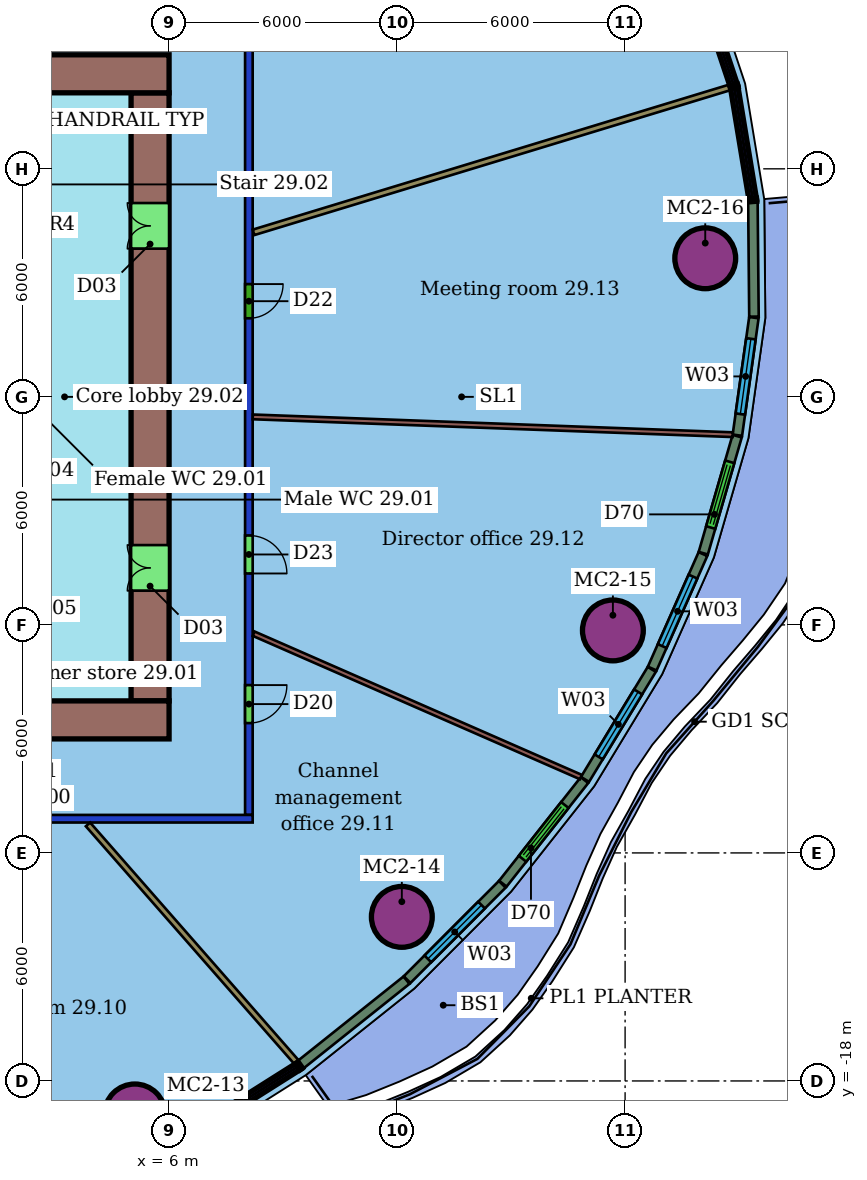
"""IFC4 building model, lengths in metres.
Left out: names, types, materials, properties, quantities, classifications, styles, units other than length and angle.
Written with IfcOpenShell. Run it as: python <this file> out.ifc"""

import sys

from ifc_helpers import new_model, si_unit, direction, frame, frame_2d, origin, origin_2d, place, context, subcontext, project, spatial, rectangle, hollow_circle, extrude, element, fill, save


model = new_model("IFC4")
c1 = context("Model", 3, precision=1e-05, world=origin(), true_north=direction((0.0, 1.0)))
c2 = subcontext(c1, "Body", "Model", "MODEL_VIEW")
j1 = project(units=[si_unit("LENGTHUNIT", "METRE"), si_unit("PLANEANGLEUNIT", "RADIAN")], contexts=[c1])
p1 = place(None, origin())
s1 = spatial("IfcSite", under=j1, at=p1, CompositionType="ELEMENT")
p2 = place(p1, origin())
s2 = spatial("IfcBuilding", under=s1, at=p2, CompositionType="ELEMENT")
p3 = place(p2, frame((0.0, 0.0, 124.6)))
s3 = spatial("IfcBuildingStorey", under=s2, at=p3, CompositionType="ELEMENT", Elevation=124.6)
for number, where, z_axis, x_axis in (
    (1, (5.1, -18.881, 0.0), (0.0, 0.0, 1.0), (1.0, 0.0, 0.0)),
    (2, (12.125, -13.683, 0.0), (0.0, 0.0, 1.0), (1.0, 0.0, 0.0)),
    (3, (17.679, -6.146, 0.0), (0.0, 0.0, 1.0), (1.0, 0.0, 0.0)),
    (4, (20.109, 3.646, 0.0), (0.0, 0.0, 1.0), (1.0, 0.0, 0.0)),
):
    element("IfcColumn", number, at=place(p3, frame(where, z_axis=z_axis, x_axis=x_axis)), inside=s3, PredefinedType="COLUMN", context=c2, shape_type="SweptSolid", body=[
        extrude(hollow_circle(Radius=0.8, WallThickness=0.055, at=origin_2d()), origin(), (0.0, 0.0, 1.0), 3.45),
    ])
p4 = place(p3, frame((8.2, -11.1, 0.0), z_axis=(0.0, 0.0, 1.0), x_axis=(-1.0, 0.0, 0.0)))
e5 = element("IfcWall", 5, at=p4, inside=s3, PredefinedType="PARTITIONING", context=c2, shape_type="SweptSolid", body=[
    extrude(rectangle(XDim=28.4, YDim=0.2, at=frame_2d((14.2, 0.0))), origin(), (0.0, 0.0, 1.0), 3.0),
])
p5 = place(p4, frame((22.496, 0.0, 0.0)))
e6 = element("IfcOpeningElement", 6, at=p5, cuts=e5, PredefinedType="OPENING", context=c2, shape_type="SweptSolid", body=[
    extrude(rectangle(XDim=0.9, YDim=2.1, at=frame_2d((0.45, 1.05))), frame((0.0, 0.11, 0.0), z_axis=(0.0, -1.0, 0.0), x_axis=(1.0, 0.0, 0.0)), (0.0, 0.0, 1.0), 0.22),
])
p6 = place(p4, frame((17.136, 0.0, 0.0)))
e7 = element("IfcOpeningElement", 7, at=p6, cuts=e5, PredefinedType="OPENING", context=c2, shape_type="SweptSolid", body=[
    extrude(rectangle(XDim=1.8, YDim=2.4, at=frame_2d((0.9, 1.2))), frame((0.0, 0.11, 0.0), z_axis=(0.0, -1.0, 0.0), x_axis=(1.0, 0.0, 0.0)), (0.0, 0.0, 1.0), 0.22),
])
p7 = place(p4, frame((12.396, 0.0, 0.0)))
e8 = element("IfcOpeningElement", 8, at=p7, cuts=e5, PredefinedType="OPENING", context=c2, shape_type="SweptSolid", body=[
    extrude(rectangle(XDim=0.9, YDim=2.1, at=frame_2d((0.45, 1.05))), frame((0.0, 0.11, 0.0), z_axis=(0.0, -1.0, 0.0), x_axis=(1.0, 0.0, 0.0)), (0.0, 0.0, 1.0), 0.22),
])
p8 = place(p4, frame((8.099, 0.0, 0.0)))
e9 = element("IfcOpeningElement", 9, at=p8, cuts=e5, PredefinedType="OPENING", context=c2, shape_type="SweptSolid", body=[
    extrude(rectangle(XDim=1.5, YDim=2.1, at=frame_2d((0.75, 1.05))), frame((0.0, 0.11, 0.0), z_axis=(0.0, -1.0, 0.0), x_axis=(1.0, 0.0, 0.0)), (0.0, 0.0, 1.0), 0.22),
])
p9 = place(p3, frame((8.1, 11.0, 0.0), z_axis=(0.0, 0.0, 1.0), x_axis=(0.0, -1.0, 0.0)))
e10 = element("IfcWall", 10, at=p9, inside=s3, PredefinedType="PARTITIONING", context=c2, shape_type="SweptSolid", body=[
    extrude(rectangle(XDim=22.0, YDim=0.2, at=frame_2d((11.0, 0.0))), origin(), (0.0, 0.0, 1.0), 3.0),
])
p10 = place(p9, frame((18.584, 0.0, 0.0)))
e11 = element("IfcOpeningElement", 11, at=p10, cuts=e10, PredefinedType="OPENING", context=c2, shape_type="SweptSolid", body=[
    extrude(rectangle(XDim=1.0, YDim=2.1, at=frame_2d((0.5, 1.05))), frame((0.0, 0.11, 0.0), z_axis=(0.0, -1.0, 0.0), x_axis=(1.0, 0.0, 0.0)), (0.0, 0.0, 1.0), 0.22),
])
p11 = place(p9, frame((14.647, 0.0, 0.0)))
e12 = element("IfcOpeningElement", 12, at=p11, cuts=e10, PredefinedType="OPENING", context=c2, shape_type="SweptSolid", body=[
    extrude(rectangle(XDim=1.0, YDim=2.4, at=frame_2d((0.5, 1.2))), frame((0.0, 0.11, 0.0), z_axis=(0.0, -1.0, 0.0), x_axis=(1.0, 0.0, 0.0)), (0.0, 0.0, 1.0), 0.22),
])
p12 = place(p9, frame((8.033, 0.0, 0.0)))
e13 = element("IfcOpeningElement", 13, at=p12, cuts=e10, PredefinedType="OPENING", context=c2, shape_type="SweptSolid", body=[
    extrude(rectangle(XDim=0.9, YDim=2.1, at=frame_2d((0.45, 1.05))), frame((0.0, 0.11, 0.0), z_axis=(0.0, -1.0, 0.0), x_axis=(1.0, 0.0, 0.0)), (0.0, 0.0, 1.0), 0.22),
])
p13 = place(p3, frame((9.349, -17.501, 0.0), z_axis=(0.0, 0.0, 1.0), x_axis=(-0.659368828272, 0.751819624845, 0.0)))
e14 = element("IfcWall", 14, at=p13, inside=s3, PredefinedType="PARTITIONING", context=c2, shape_type="SweptSolid", body=[
    extrude(rectangle(XDim=8.316, YDim=0.15, at=frame_2d((4.158, 0.0))), origin(), (0.0, 0.0, 1.0), 3.45),
])
p14 = place(p3, frame((16.836, -10.003, 0.0), z_axis=(0.0, 0.0, 1.0), x_axis=(-0.915971282718, 0.401243827661, 0.0)))
e15 = element("IfcWall", 15, at=p14, inside=s3, PredefinedType="PARTITIONING", context=c2, shape_type="SweptSolid", body=[
    extrude(rectangle(XDim=9.401, YDim=0.125, at=frame_2d((4.701, 0.0))), origin(), (0.0, 0.0, 1.0), 3.45),
])
p15 = place(p3, frame((20.83, -0.995, 0.0), z_axis=(0.0, 0.0, 1.0), x_axis=(-0.999313191899, 0.037055964389, 0.0)))
e16 = element("IfcWall", 16, at=p15, inside=s3, PredefinedType="PARTITIONING", context=c2, shape_type="SweptSolid", body=[
    extrude(rectangle(XDim=12.637, YDim=0.125, at=frame_2d((6.318, 0.0))), origin(), (0.0, 0.0, 1.0), 3.45),
])
p16 = place(p3, frame((20.746, 8.14, 0.0), z_axis=(0.0, 0.0, 1.0), x_axis=(-0.956669363106, -0.291176458003, 0.0)))
e17 = element("IfcWall", 17, at=p16, inside=s3, PredefinedType="PARTITIONING", context=c2, shape_type="SweptSolid", body=[
    extrude(rectangle(XDim=13.091, YDim=0.15, at=frame_2d((6.545, 0.0))), origin(), (0.0, 0.0, 1.0), 3.45),
])
p17 = place(p3, frame((9.465, -17.569, 0.0), z_axis=(0.0, 0.0, 1.0), x_axis=(0.781691181116, 0.623665693594, 0.0)))
e18 = element("IfcWall", 18, at=p17, inside=s3, PredefinedType="SOLIDWALL", context=c2, shape_type="SweptSolid", body=[
    extrude(rectangle(XDim=3.56, YDim=0.25, at=frame_2d((1.78, 0.0))), origin(), (0.0, 0.0, 1.0), 3.05),
])
p18 = place(p3, frame((12.264, -15.334, 0.0), z_axis=(0.0, 0.0, 1.0), x_axis=(0.706555538576, 0.707657594397, 0.0)))
e19 = element("IfcWall", 19, at=p18, inside=s3, PredefinedType="SOLIDWALL", context=c2, shape_type="SweptSolid", body=[
    extrude(rectangle(XDim=3.544, YDim=0.25, at=frame_2d((1.772, 0.0))), origin(), (0.0, 0.0, 1.0), 3.05),
])
p19 = place(p18, frame((0.772, 0.0, 0.9)))
e20 = element("IfcOpeningElement", 20, at=p19, cuts=e19, PredefinedType="OPENING", context=c2, shape_type="SweptSolid", body=[
    extrude(rectangle(XDim=2.0, YDim=2.1, at=frame_2d((1.0, 1.05))), frame((0.0, 0.135, 0.0), z_axis=(0.0, -1.0, 0.0), x_axis=(1.0, 0.0, 0.0)), (0.0, 0.0, 1.0), 0.27),
])
p20 = place(p3, frame((14.783, -12.809, 0.0), z_axis=(0.0, 0.0, 1.0), x_axis=(0.61919708365, 0.785235615341, 0.0)))
e21 = element("IfcWall", 21, at=p20, inside=s3, PredefinedType="SOLIDWALL", context=c2, shape_type="SweptSolid", body=[
    extrude(rectangle(XDim=3.47, YDim=0.25, at=frame_2d((1.735, 0.0))), origin(), (0.0, 0.0, 1.0), 3.05),
])
p21 = place(p20, frame((0.835, 0.0, 0.0)))
e22 = element("IfcOpeningElement", 22, at=p21, cuts=e21, PredefinedType="OPENING", context=c2, shape_type="SweptSolid", body=[
    extrude(rectangle(XDim=1.8, YDim=2.4, at=frame_2d((0.9, 1.2))), frame((0.0, 0.135, 0.0), z_axis=(0.0, -1.0, 0.0), x_axis=(1.0, 0.0, 0.0)), (0.0, 0.0, 1.0), 0.27),
])
p22 = place(p3, frame((16.945, -10.065, 0.0), z_axis=(0.0, 0.0, 1.0), x_axis=(0.518868982656, 0.85485377629, 0.0)))
e23 = element("IfcWall", 23, at=p22, inside=s3, PredefinedType="SOLIDWALL", context=c2, shape_type="SweptSolid", body=[
    extrude(rectangle(XDim=3.385, YDim=0.25, at=frame_2d((1.693, 0.0))), origin(), (0.0, 0.0, 1.0), 3.05),
])
p23 = place(p22, frame((0.693, 0.0, 0.9)))
e24 = element("IfcOpeningElement", 24, at=p23, cuts=e23, PredefinedType="OPENING", context=c2, shape_type="SweptSolid", body=[
    extrude(rectangle(XDim=2.0, YDim=2.1, at=frame_2d((1.0, 1.05))), frame((0.0, 0.135, 0.0), z_axis=(0.0, -1.0, 0.0), x_axis=(1.0, 0.0, 0.0)), (0.0, 0.0, 1.0), 0.27),
])
p24 = place(p3, frame((18.713, -7.149, 0.0), z_axis=(0.0, 0.0, 1.0), x_axis=(0.405155306017, 0.914247875582, 0.0)))
e25 = element("IfcWall", 25, at=p24, inside=s3, PredefinedType="SOLIDWALL", context=c2, shape_type="SweptSolid", body=[
    extrude(rectangle(XDim=3.296, YDim=0.25, at=frame_2d((1.648, 0.0))), origin(), (0.0, 0.0, 1.0), 3.05),
])
p25 = place(p24, frame((0.648, 0.0, 0.9)))
e26 = element("IfcOpeningElement", 26, at=p25, cuts=e25, PredefinedType="OPENING", context=c2, shape_type="SweptSolid", body=[
    extrude(rectangle(XDim=2.0, YDim=2.1, at=frame_2d((1.0, 1.05))), frame((0.0, 0.135, 0.0), z_axis=(0.0, -1.0, 0.0), x_axis=(1.0, 0.0, 0.0)), (0.0, 0.0, 1.0), 0.27),
])
p26 = place(p3, frame((20.057, -4.113, 0.0), z_axis=(0.0, 0.0, 1.0), x_axis=(0.27825961791, 0.960505900576, 0.0)))
e27 = element("IfcWall", 27, at=p26, inside=s3, PredefinedType="SOLIDWALL", context=c2, shape_type="SweptSolid", body=[
    extrude(rectangle(XDim=3.206, YDim=0.25, at=frame_2d((1.603, 0.0))), origin(), (0.0, 0.0, 1.0), 3.05),
])
p27 = place(p26, frame((0.703, 0.0, 0.0)))
e28 = element("IfcOpeningElement", 28, at=p27, cuts=e27, PredefinedType="OPENING", context=c2, shape_type="SweptSolid", body=[
    extrude(rectangle(XDim=1.8, YDim=2.4, at=frame_2d((0.9, 1.2))), frame((0.0, 0.135, 0.0), z_axis=(0.0, -1.0, 0.0), x_axis=(1.0, 0.0, 0.0)), (0.0, 0.0, 1.0), 0.27),
])
p28 = place(p3, frame((20.954, -1.009, 0.0), z_axis=(0.0, 0.0, 1.0), x_axis=(0.139133868146, 0.990273581762, 0.0)))
e29 = element("IfcWall", 29, at=p28, inside=s3, PredefinedType="SOLIDWALL", context=c2, shape_type="SweptSolid", body=[
    extrude(rectangle(XDim=3.123, YDim=0.25, at=frame_2d((1.562, 0.0))), origin(), (0.0, 0.0, 1.0), 3.05),
])
p29 = place(p28, frame((0.562, 0.0, 0.9)))
e30 = element("IfcOpeningElement", 30, at=p29, cuts=e29, PredefinedType="OPENING", context=c2, shape_type="SweptSolid", body=[
    extrude(rectangle(XDim=2.0, YDim=2.1, at=frame_2d((1.0, 1.05))), frame((0.0, 0.135, 0.0), z_axis=(0.0, -1.0, 0.0), x_axis=(1.0, 0.0, 0.0)), (0.0, 0.0, 1.0), 0.27),
])
p30 = place(p3, frame((21.391, 2.111, 0.0), z_axis=(0.0, 0.0, 1.0), x_axis=(-0.009399908842, 0.999955819881, 0.0)))
e31 = element("IfcWall", 31, at=p30, inside=s3, PredefinedType="SOLIDWALL", context=c2, shape_type="SweptSolid", body=[
    extrude(rectangle(XDim=3.013, YDim=0.25, at=frame_2d((1.506, 0.0))), origin(), (0.0, 0.0, 1.0), 3.05),
])
p31 = place(p3, frame((6.0, 8.5, 0.0), z_axis=(0.0, 0.0, 1.0), x_axis=(-1.0, 0.0, 0.0)))
e32 = element("IfcWall", 32, at=p31, inside=s3, PredefinedType="SHEAR", context=c2, shape_type="SweptSolid", body=[
    extrude(rectangle(XDim=12.0, YDim=1.0, at=frame_2d((6.0, 0.0))), origin(), (0.0, 0.0, 1.0), 3.3),
])
p32 = place(p31, frame((5.6, 0.0, 0.0)))
e33 = element("IfcOpeningElement", 33, at=p32, cuts=e32, PredefinedType="OPENING", context=c2, shape_type="SweptSolid", body=[
    extrude(rectangle(XDim=1.2, YDim=2.1, at=frame_2d((0.6, 1.05))), frame((0.0, 0.51, 0.0), z_axis=(0.0, -1.0, 0.0), x_axis=(1.0, 0.0, 0.0)), (0.0, 0.0, 1.0), 1.02),
])
p33 = place(p3, frame((-18.0, -8.5, 0.0), z_axis=(0.0, 0.0, 1.0), x_axis=(1.0, 0.0, 0.0)))
e34 = element("IfcWall", 34, at=p33, inside=s3, PredefinedType="SHEAR", context=c2, shape_type="SweptSolid", body=[
    extrude(rectangle(XDim=24.0, YDim=1.0, at=frame_2d((12.0, 0.0))), origin(), (0.0, 0.0, 1.0), 3.3),
])
p34 = place(p33, frame((6.0, 0.0, 0.0)))
e35 = element("IfcOpeningElement", 35, at=p34, cuts=e34, PredefinedType="OPENING", context=c2, shape_type="SweptSolid", body=[
    extrude(rectangle(XDim=1.2, YDim=2.1, at=frame_2d((0.6, 1.05))), frame((0.0, 0.51, 0.0), z_axis=(0.0, -1.0, 0.0), x_axis=(1.0, 0.0, 0.0)), (0.0, 0.0, 1.0), 1.02),
])
p35 = place(p3, frame((5.5, -8.0, 0.0), z_axis=(0.0, 0.0, 1.0), x_axis=(0.0, 1.0, 0.0)))
e36 = element("IfcWall", 36, at=p35, inside=s3, PredefinedType="SHEAR", context=c2, shape_type="SweptSolid", body=[
    extrude(rectangle(XDim=16.0, YDim=1.0, at=frame_2d((8.0, 0.0))), origin(), (0.0, 0.0, 1.0), 3.3),
])
p36 = place(p35, frame((2.9, 0.0, 0.0)))
e37 = element("IfcOpeningElement", 37, at=p36, cuts=e36, PredefinedType="OPENING", context=c2, shape_type="SweptSolid", body=[
    extrude(rectangle(XDim=1.2, YDim=2.1, at=frame_2d((0.6, 1.05))), frame((0.0, 0.51, 0.0), z_axis=(0.0, -1.0, 0.0), x_axis=(1.0, 0.0, 0.0)), (0.0, 0.0, 1.0), 1.02),
])
p37 = place(p35, frame((11.9, 0.0, 0.0)))
e38 = element("IfcOpeningElement", 38, at=p37, cuts=e36, PredefinedType="OPENING", context=c2, shape_type="SweptSolid", body=[
    extrude(rectangle(XDim=1.2, YDim=2.1, at=frame_2d((0.6, 1.05))), frame((0.0, 0.51, 0.0), z_axis=(0.0, -1.0, 0.0), x_axis=(1.0, 0.0, 0.0)), (0.0, 0.0, 1.0), 1.02),
])
p38 = place(p10, origin())
e39 = element("IfcDoor", 39, at=p38, inside=s3, OperationType="SINGLE_SWING_LEFT", PredefinedType="DOOR", context=c2, shape_type="SweptSolid", body=[
    extrude(rectangle(XDim=1.0, YDim=2.1, at=frame_2d((0.5, 1.05))), frame((0.0, 0.025, 0.0), z_axis=(0.0, -1.0, 0.0), x_axis=(1.0, 0.0, 0.0)), (0.0, 0.0, 1.0), 0.05),
])
fill(e11, e39)
p39 = place(p11, origin())
e40 = element("IfcDoor", 40, at=p39, inside=s3, OperationType="SINGLE_SWING_RIGHT", PredefinedType="DOOR", context=c2, shape_type="SweptSolid", body=[
    extrude(rectangle(XDim=1.0, YDim=2.4, at=frame_2d((0.5, 1.2))), frame((0.0, 0.025, 0.0), z_axis=(0.0, -1.0, 0.0), x_axis=(1.0, 0.0, 0.0)), (0.0, 0.0, 1.0), 0.05),
])
fill(e12, e40)
p40 = place(p12, origin())
e41 = element("IfcDoor", 41, at=p40, inside=s3, OperationType="SINGLE_SWING_LEFT", PredefinedType="DOOR", context=c2, shape_type="SweptSolid", body=[
    extrude(rectangle(XDim=0.9, YDim=2.1, at=frame_2d((0.45, 1.05))), frame((0.0, 0.025, 0.0), z_axis=(0.0, -1.0, 0.0), x_axis=(1.0, 0.0, 0.0)), (0.0, 0.0, 1.0), 0.05),
])
fill(e13, e41)
p41 = place(p19, origin())
e42 = element("IfcWindow", 42, at=p41, inside=s3, PartitioningType="SINGLE_PANEL", PredefinedType="WINDOW", context=c2, shape_type="SweptSolid", body=[
    extrude(rectangle(XDim=2.0, YDim=2.1, at=frame_2d((1.0, 1.05))), frame((0.0, 0.03, 0.0), z_axis=(0.0, -1.0, 0.0), x_axis=(1.0, 0.0, 0.0)), (0.0, 0.0, 1.0), 0.06),
])
fill(e20, e42)
p42 = place(p21, origin())
e43 = element("IfcDoor", 43, at=p42, inside=s3, OperationType="DOUBLE_DOOR_SLIDING", PredefinedType="DOOR", context=c2, shape_type="SweptSolid", body=[
    extrude(rectangle(XDim=1.8, YDim=2.4, at=frame_2d((0.9, 1.2))), frame((0.0, 0.025, 0.0), z_axis=(0.0, -1.0, 0.0), x_axis=(1.0, 0.0, 0.0)), (0.0, 0.0, 1.0), 0.05),
])
fill(e22, e43)
p43 = place(p23, origin())
e44 = element("IfcWindow", 44, at=p43, inside=s3, PartitioningType="SINGLE_PANEL", PredefinedType="WINDOW", context=c2, shape_type="SweptSolid", body=[
    extrude(rectangle(XDim=2.0, YDim=2.1, at=frame_2d((1.0, 1.05))), frame((0.0, 0.03, 0.0), z_axis=(0.0, -1.0, 0.0), x_axis=(1.0, 0.0, 0.0)), (0.0, 0.0, 1.0), 0.06),
])
fill(e24, e44)
p44 = place(p25, origin())
e45 = element("IfcWindow", 45, at=p44, inside=s3, PartitioningType="SINGLE_PANEL", PredefinedType="WINDOW", context=c2, shape_type="SweptSolid", body=[
    extrude(rectangle(XDim=2.0, YDim=2.1, at=frame_2d((1.0, 1.05))), frame((0.0, 0.03, 0.0), z_axis=(0.0, -1.0, 0.0), x_axis=(1.0, 0.0, 0.0)), (0.0, 0.0, 1.0), 0.06),
])
fill(e26, e45)
p45 = place(p27, origin())
e46 = element("IfcDoor", 46, at=p45, inside=s3, OperationType="DOUBLE_DOOR_SLIDING", PredefinedType="DOOR", context=c2, shape_type="SweptSolid", body=[
    extrude(rectangle(XDim=1.8, YDim=2.4, at=frame_2d((0.9, 1.2))), frame((0.0, 0.025, 0.0), z_axis=(0.0, -1.0, 0.0), x_axis=(1.0, 0.0, 0.0)), (0.0, 0.0, 1.0), 0.05),
])
fill(e28, e46)
p46 = place(p29, origin())
e47 = element("IfcWindow", 47, at=p46, inside=s3, PartitioningType="SINGLE_PANEL", PredefinedType="WINDOW", context=c2, shape_type="SweptSolid", body=[
    extrude(rectangle(XDim=2.0, YDim=2.1, at=frame_2d((1.0, 1.05))), frame((0.0, 0.03, 0.0), z_axis=(0.0, -1.0, 0.0), x_axis=(1.0, 0.0, 0.0)), (0.0, 0.0, 1.0), 0.06),
])
fill(e30, e47)
p47 = place(p36, origin())
e48 = element("IfcDoor", 48, at=p47, inside=s3, OperationType="DOUBLE_DOOR_SINGLE_SWING", PredefinedType="NOTDEFINED", context=c2, shape_type="SweptSolid", body=[
    extrude(rectangle(XDim=1.2, YDim=2.1, at=frame_2d((0.6, 1.05))), frame((0.0, 0.025, 0.0), z_axis=(0.0, -1.0, 0.0), x_axis=(1.0, 0.0, 0.0)), (0.0, 0.0, 1.0), 0.05),
])
fill(e37, e48)
p48 = place(p37, origin())
e49 = element("IfcDoor", 49, at=p48, inside=s3, OperationType="DOUBLE_DOOR_SINGLE_SWING", PredefinedType="NOTDEFINED", context=c2, shape_type="SweptSolid", body=[
    extrude(rectangle(XDim=1.2, YDim=2.1, at=frame_2d((0.6, 1.05))), frame((0.0, 0.025, 0.0), z_axis=(0.0, -1.0, 0.0), x_axis=(1.0, 0.0, 0.0)), (0.0, 0.0, 1.0), 0.05),
])
fill(e38, e49)
save(model, sys.argv[1])
